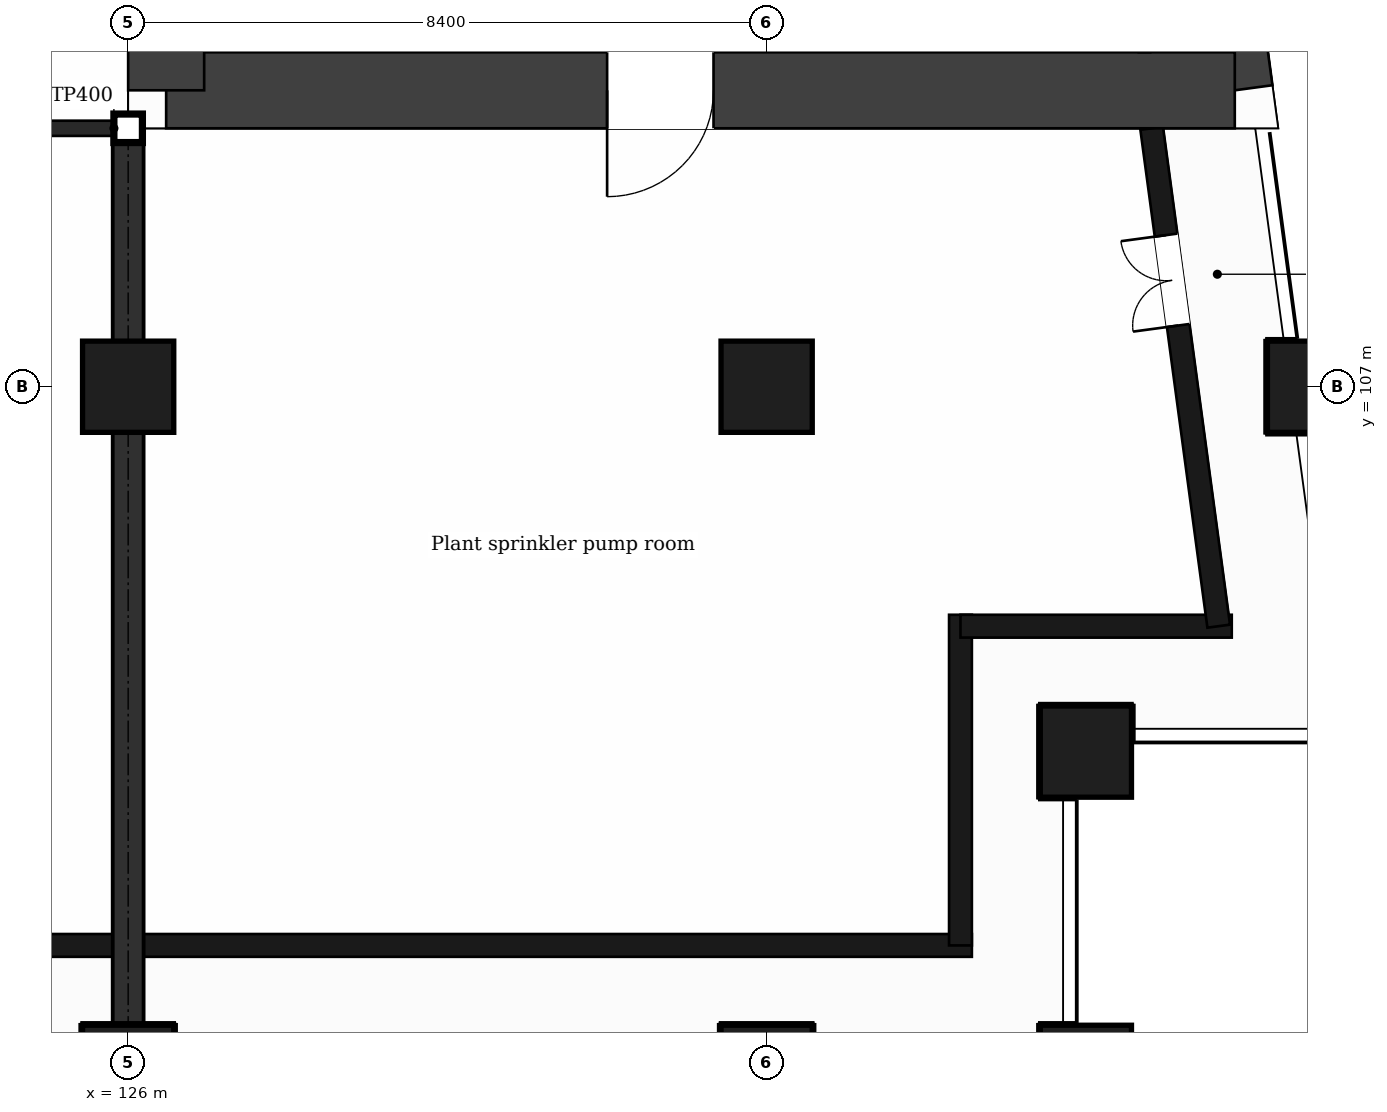
"""IFC4 building model, lengths in metres.
Left out: names, types, materials, properties, quantities, classifications, styles, units other than length and angle.
Written with IfcOpenShell. Run it as: python <this file> out.ifc"""

import sys

from ifc_helpers import new_model, si_unit, direction, frame, frame_2d, origin, origin_2d, place, context, subcontext, project, spatial, rectangle, extrude, element, fill, save


model = new_model("IFC4")
c1 = context("Model", 3, precision=1e-05, world=origin(), true_north=direction((0.0, 1.0)))
c2 = subcontext(c1, "Body", "Model", "MODEL_VIEW")
j1 = project(units=[si_unit("LENGTHUNIT", "METRE"), si_unit("PLANEANGLEUNIT", "RADIAN")], contexts=[c1])
p1 = place(None, origin())
s1 = spatial("IfcSite", under=j1, at=p1, CompositionType="ELEMENT")
p2 = place(p1, origin())
s2 = spatial("IfcBuilding", under=s1, at=p2, CompositionType="ELEMENT")
p3 = place(p2, frame((0.0, 0.0, 142.8)))
s3 = spatial("IfcBuildingStorey", under=s2, at=p3, CompositionType="ELEMENT", Elevation=142.8)
p4 = place(p3, frame((137.732, 131.9, 0.0), z_axis=(0.0, 0.0, 1.0), x_axis=(0.133411141623, -0.991060778808, 0.0)))
e1 = element("IfcWall", 1, at=p4, inside=s3, PredefinedType="SHEAR", context=c2, shape_type="SweptSolid", body=[
    extrude(rectangle(XDim=21.189, YDim=1.0, at=frame_2d((10.595, 0.0))), origin(), (0.0, 0.0, 1.0), 5.0),
])
p5 = place(p3, frame((140.559, 110.9, 0.0), z_axis=(0.0, 0.0, 1.0), x_axis=(-1.0, 0.0, 0.0)))
e2 = element("IfcWall", 2, at=p5, inside=s3, PredefinedType="SHEAR", context=c2, shape_type="SweptSolid", body=[
    extrude(rectangle(XDim=14.059, YDim=1.0, at=frame_2d((7.029, 0.0))), origin(), (0.0, 0.0, 1.0), 5.0),
])
p6 = place(p5, frame((6.858, 0.0, 0.0)))
e3 = element("IfcOpeningElement", 3, at=p6, cuts=e2, PredefinedType="OPENING", context=c2, shape_type="SweptSolid", body=[
    extrude(rectangle(XDim=1.4, YDim=2.1, at=frame_2d((0.7, 1.05))), frame((0.0, 0.51, 0.0), z_axis=(0.0, -1.0, 0.0), x_axis=(1.0, 0.0, 0.0)), (0.0, 0.0, 1.0), 1.02),
])
p7 = place(p3, frame((126.5, 110.9, 0.0), z_axis=(0.0, 0.0, 1.0), x_axis=(0.0, 1.0, 0.0)))
e4 = element("IfcWall", 4, at=p7, inside=s3, PredefinedType="SHEAR", context=c2, shape_type="SweptSolid", body=[
    extrude(rectangle(XDim=21.0, YDim=1.0, at=frame_2d((10.5, 0.0))), origin(), (0.0, 0.0, 1.0), 5.0),
])
p8 = place(p7, frame((17.5, 0.0, 0.0)))
e5 = element("IfcOpeningElement", 5, at=p8, cuts=e4, PredefinedType="OPENING", context=c2, shape_type="SweptSolid", body=[
    extrude(rectangle(XDim=1.2, YDim=2.1, at=frame_2d((0.6, 1.05))), frame((0.0, 0.51, 0.0), z_axis=(0.0, -1.0, 0.0), x_axis=(1.0, 0.0, 0.0)), (0.0, 0.0, 1.0), 1.02),
])
p9 = place(p7, frame((11.85, 0.0, 0.0)))
e6 = element("IfcOpeningElement", 6, at=p9, cuts=e4, PredefinedType="OPENING", context=c2, shape_type="SweptSolid", body=[
    extrude(rectangle(XDim=1.4, YDim=2.1, at=frame_2d((0.7, 1.05))), frame((0.0, 0.51, 0.0), z_axis=(0.0, -1.0, 0.0), x_axis=(1.0, 0.0, 0.0)), (0.0, 0.0, 1.0), 1.02),
])
for number, where, z_axis, x_axis in (
    (7, (126.0, 98.0, 0.0), (0.0, 0.0, 1.0), (1.0, 0.0, 0.0)),
    (8, (134.4, 98.0, 0.0), (0.0, 0.0, 1.0), (1.0, 0.0, 0.0)),
    (9, (138.6, 98.0, 0.0), (0.0, 0.0, 1.0), (1.0, 0.0, 0.0)),
    (10, (138.6, 102.2, 0.0), (0.0, 0.0, 1.0), (1.0, 0.0, 0.0)),
    (11, (126.0, 107.0, 0.0), (0.0, 0.0, 1.0), (1.0, 0.0, 0.0)),
    (12, (134.4, 107.0, 0.0), (0.0, 0.0, 1.0), (1.0, 0.0, 0.0)),
    (13, (141.588, 107.0, 0.0), (0.0, 0.0, 1.0), (1.0, 0.0, 0.0)),
):
    element("IfcColumn", number, at=place(p3, frame(where, z_axis=z_axis, x_axis=x_axis)), inside=s3, PredefinedType="COLUMN", context=c2, shape_type="SweptSolid", body=[
        extrude(rectangle(XDim=1.2, YDim=1.2, at=origin_2d()), origin(), (0.0, 0.0, 1.0), 5.0),
    ])
p10 = place(p3, frame((89.85, 99.65, 0.0), z_axis=(0.0, 0.0, 1.0), x_axis=(1.0, 0.0, 0.0)))
e14 = element("IfcWall", 14, at=p10, inside=s3, PredefinedType="SOLIDWALL", context=c2, shape_type="SweptSolid", body=[
    extrude(rectangle(XDim=47.25, YDim=0.3, at=frame_2d((23.625, 0.0))), origin(), (0.0, 0.0, 1.0), 4.68),
])
p11 = place(p10, frame((25.05, 0.0, 0.0)))
e15 = element("IfcOpeningElement", 15, at=p11, cuts=e14, PredefinedType="OPENING", context=c2, shape_type="SweptSolid", body=[
    extrude(rectangle(XDim=1.2, YDim=2.4, at=frame_2d((0.6, 1.2))), frame((0.0, 0.16, 0.0), z_axis=(0.0, -1.0, 0.0), x_axis=(1.0, 0.0, 0.0)), (0.0, 0.0, 1.0), 0.32),
])
p12 = place(p3, frame((136.95, 99.65, 0.0), z_axis=(0.0, 0.0, 1.0), x_axis=(0.0, 1.0, 0.0)))
e16 = element("IfcWall", 16, at=p12, inside=s3, PredefinedType="SOLIDWALL", context=c2, shape_type="SweptSolid", body=[
    extrude(rectangle(XDim=4.35, YDim=0.3, at=frame_2d((2.175, 0.0))), origin(), (0.0, 0.0, 1.0), 4.68),
])
p13 = place(p3, frame((136.95, 103.85, 0.0), z_axis=(0.0, 0.0, 1.0), x_axis=(1.0, 0.0, 0.0)))
e17 = element("IfcWall", 17, at=p13, inside=s3, PredefinedType="SOLIDWALL", context=c2, shape_type="SweptSolid", body=[
    extrude(rectangle(XDim=3.569, YDim=0.3, at=frame_2d((1.785, 0.0))), origin(), (0.0, 0.0, 1.0), 4.68),
])
p14 = place(p3, frame((140.348, 103.85, 0.0), z_axis=(0.0, 0.0, 1.0), x_axis=(-0.133431549479, 0.991058031401, 0.0)))
e18 = element("IfcWall", 18, at=p14, inside=s3, PredefinedType="SOLIDWALL", context=c2, shape_type="SweptSolid", body=[
    extrude(rectangle(XDim=6.609, YDim=0.3, at=frame_2d((3.304, 0.0))), origin(), (0.0, 0.0, 1.0), 4.68),
])
p15 = place(p14, frame((3.991, 0.0, 0.0)))
e19 = element("IfcOpeningElement", 19, at=p15, cuts=e18, PredefinedType="OPENING", context=c2, shape_type="SweptSolid", body=[
    extrude(rectangle(XDim=1.2, YDim=2.4, at=frame_2d((0.6, 1.2))), frame((0.0, 0.16, 0.0), z_axis=(0.0, -1.0, 0.0), x_axis=(1.0, 0.0, 0.0)), (0.0, 0.0, 1.0), 0.32),
])
p16 = place(p3, frame((100.7, 110.4, 0.0), z_axis=(0.0, 0.0, 1.0), x_axis=(1.0, 0.0, 0.0)))
e20 = element("IfcWall", 20, at=p16, inside=s3, PredefinedType="PARTITIONING", context=c2, shape_type="SweptSolid", body=[
    extrude(rectangle(XDim=25.4, YDim=0.2, at=frame_2d((12.7, 0.0))), origin(), (0.0, 0.0, 1.0), 4.68),
])
p17 = place(p16, frame((20.5, 0.0, 0.0)))
e21 = element("IfcOpeningElement", 21, at=p17, cuts=e20, PredefinedType="OPENING", context=c2, shape_type="SweptSolid", body=[
    extrude(rectangle(XDim=1.2, YDim=2.1, at=frame_2d((0.6, 1.05))), frame((0.0, 0.11, 0.0), z_axis=(0.0, -1.0, 0.0), x_axis=(1.0, 0.0, 0.0)), (0.0, 0.0, 1.0), 0.22),
])
p18 = place(p3, frame((126.0, 99.79, 0.0), z_axis=(0.0, 0.0, 1.0), x_axis=(0.0, 1.0, 0.0)))
e22 = element("IfcWall", 22, at=p18, inside=s3, PredefinedType="PARTITIONING", context=c2, shape_type="SweptSolid", body=[
    extrude(rectangle(XDim=10.51, YDim=0.2, at=frame_2d((5.255, 0.0))), origin(), (0.0, 0.0, 1.0), 4.68),
])
p19 = place(p3, frame((139.371, 111.4, 0.0), z_axis=(0.0, 0.0, 1.0), x_axis=(0.0, 1.0, 0.0)))
e23 = element("IfcWall", 23, at=p19, inside=s3, PredefinedType="PARTITIONING", context=c2, shape_type="SweptSolid", body=[
    extrude(rectangle(XDim=1.8, YDim=0.15, at=frame_2d((0.9, 0.0))), origin(), (0.0, 0.0, 1.0), 4.68),
])
p20 = place(p15, origin())
e24 = element("IfcDoor", 24, at=p20, inside=s3, OperationType="DOUBLE_DOOR_SINGLE_SWING", PredefinedType="DOOR", context=c2, shape_type="SweptSolid", body=[
    extrude(rectangle(XDim=1.2, YDim=2.4, at=frame_2d((0.6, 1.2))), frame((0.0, 0.025, 0.0), z_axis=(0.0, -1.0, 0.0), x_axis=(1.0, 0.0, 0.0)), (0.0, 0.0, 1.0), 0.05),
])
fill(e19, e24)
p21 = place(p6, origin())
e25 = element("IfcDoor", 25, at=p21, inside=s3, OperationType="SINGLE_SWING_RIGHT", PredefinedType="DOOR", context=c2, shape_type="SweptSolid", body=[
    extrude(rectangle(XDim=1.4, YDim=2.1, at=frame_2d((0.7, 1.05))), frame((0.0, 0.025, 0.0), z_axis=(0.0, -1.0, 0.0), x_axis=(1.0, 0.0, 0.0)), (0.0, 0.0, 1.0), 0.05),
])
fill(e3, e25)
save(model, sys.argv[1])
